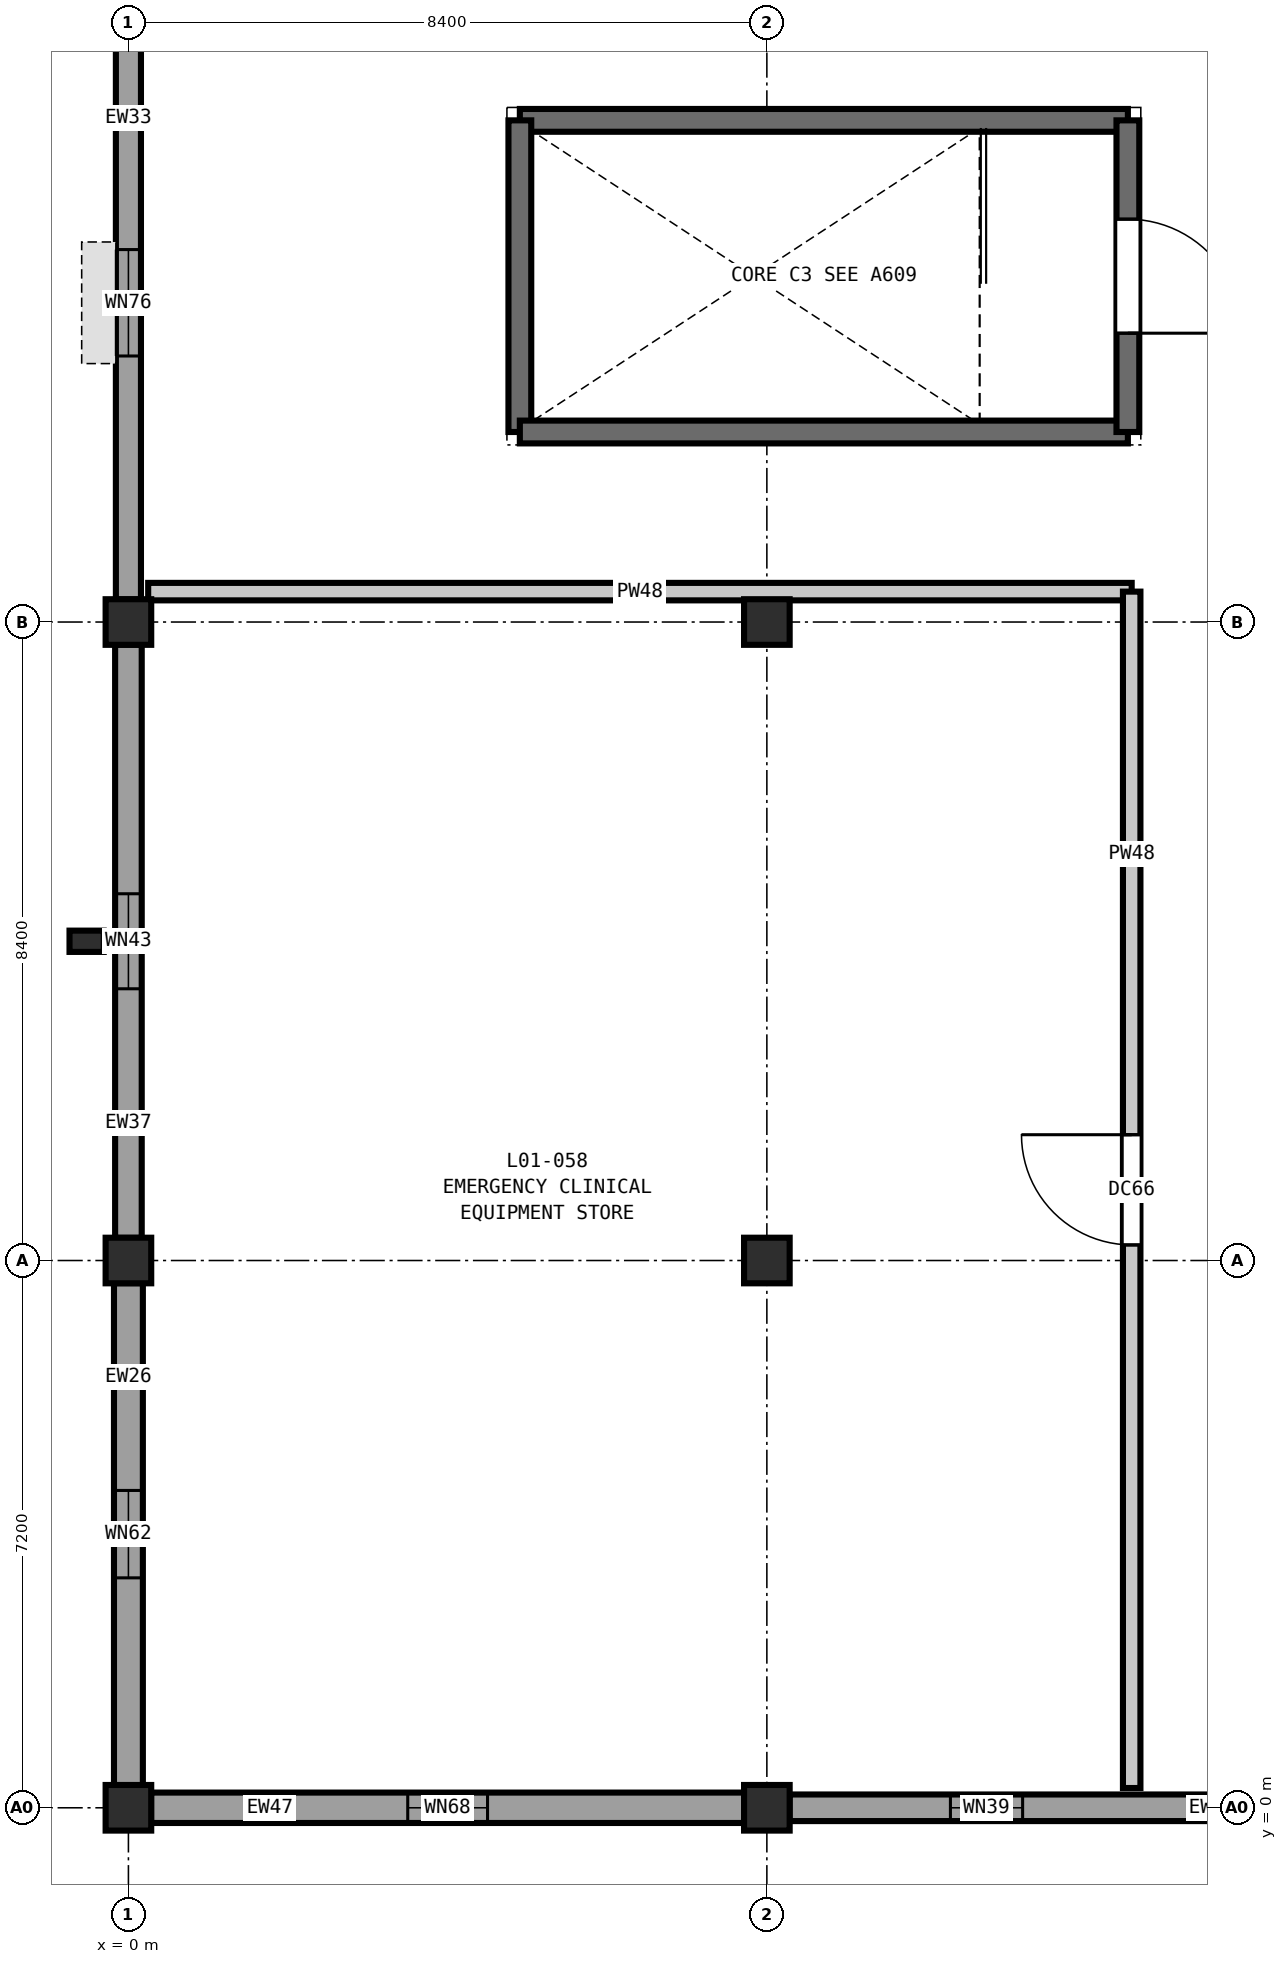
"""IFC4 building model, lengths in metres.
Left out: names, types, materials, properties, quantities, classifications, styles, units other than length and angle.
Written with IfcOpenShell. Run it as: python <this file> out.ifc"""

import sys

from ifc_helpers import new_model, si_unit, direction, frame, frame_2d, origin, origin_2d, place, context, subcontext, project, spatial, rectangle, extrude, element, fill, save


model = new_model("IFC4")
c1 = context("Model", 3, precision=1e-05, world=origin(), true_north=direction((0.0, 1.0)))
c2 = subcontext(c1, "Body", "Model", "MODEL_VIEW")
j1 = project(units=[si_unit("LENGTHUNIT", "METRE"), si_unit("PLANEANGLEUNIT", "RADIAN")], contexts=[c1])
p1 = place(None, origin())
s1 = spatial("IfcSite", under=j1, at=p1, CompositionType="ELEMENT")
p2 = place(p1, origin())
s2 = spatial("IfcBuilding", under=s1, at=p2, CompositionType="ELEMENT")
p3 = place(p2, frame((0.0, 0.0, 5.4)))
s3 = spatial("IfcBuildingStorey", under=s2, at=p3, CompositionType="ELEMENT", Elevation=5.4)
for number, where, z_axis, x_axis in (
    (1, (0.0, 0.0, 0.0), (0.0, 0.0, 1.0), (1.0, 0.0, 0.0)),
    (2, (0.0, 7.2, 0.0), (0.0, 0.0, 1.0), (1.0, 0.0, 0.0)),
    (3, (0.0, 15.6, 0.0), (0.0, 0.0, 1.0), (1.0, 0.0, 0.0)),
    (4, (8.4, 0.0, 0.0), (0.0, 0.0, 1.0), (1.0, 0.0, 0.0)),
    (5, (8.4, 7.2, 0.0), (0.0, 0.0, 1.0), (1.0, 0.0, 0.0)),
    (6, (8.4, 15.6, 0.0), (0.0, 0.0, 1.0), (1.0, 0.0, 0.0)),
):
    element("IfcColumn", number, at=place(p3, frame(where, z_axis=z_axis, x_axis=x_axis)), inside=s3, PredefinedType="COLUMN", context=c2, shape_type="SweptSolid", body=[
        extrude(rectangle(XDim=0.6, YDim=0.6, at=origin_2d()), origin(), (0.0, 0.0, 1.0), 5.4),
    ])
p4 = place(p3, frame((-0.55, 11.4, 0.0), z_axis=(0.0, 0.0, 1.0), x_axis=(1.0, 0.0, 0.0)))
e7 = element("IfcColumn", 7, at=p4, inside=s3, PredefinedType="PILASTER", context=c2, shape_type="SweptSolid", body=[
    extrude(rectangle(XDim=0.45, YDim=0.28, at=origin_2d()), origin(), (0.0, 0.0, 1.0), 5.4),
])
p5 = place(p3, frame((16.502, 0.0, 0.0), z_axis=(0.0, 0.0, 1.0), x_axis=(-1.0, 0.0, 0.0)))
e8 = element("IfcWall", 8, at=p5, inside=s3, PredefinedType="SOLIDWALL", context=c2, shape_type="SweptSolid", body=[
    extrude(rectangle(XDim=7.804, YDim=0.35, at=frame_2d((3.902, 0.0))), origin(), (0.0, 0.0, 1.0), 4.68),
])
p6 = place(p5, frame((4.737, 0.0, 0.9)))
e9 = element("IfcOpeningElement", 9, at=p6, cuts=e8, PredefinedType="OPENING", context=c2, shape_type="SweptSolid", body=[
    extrude(rectangle(XDim=0.95, YDim=1.4, at=frame_2d((0.475, 0.7))), frame((0.0, 0.185, 0.0), z_axis=(0.0, -1.0, 0.0), x_axis=(1.0, 0.0, 0.0)), (0.0, 0.0, 1.0), 0.37),
])
p7 = place(p3, frame((8.102, 0.0, 0.0), z_axis=(0.0, 0.0, 1.0), x_axis=(-1.0, 0.0, 0.0)))
e10 = element("IfcWall", 10, at=p7, inside=s3, PredefinedType="SOLIDWALL", context=c2, shape_type="SweptSolid", body=[
    extrude(rectangle(XDim=7.804, YDim=0.4, at=frame_2d((3.902, 0.0))), origin(), (0.0, 0.0, 1.0), 4.68),
])
p8 = place(p7, frame((3.377, 0.0, 0.9)))
e11 = element("IfcOpeningElement", 11, at=p8, cuts=e10, PredefinedType="OPENING", context=c2, shape_type="SweptSolid", body=[
    extrude(rectangle(XDim=1.05, YDim=1.4, at=frame_2d((0.525, 0.7))), frame((0.0, 0.21, 0.0), z_axis=(0.0, -1.0, 0.0), x_axis=(1.0, 0.0, 0.0)), (0.0, 0.0, 1.0), 0.42),
])
p9 = place(p3, frame((0.0, 0.298, 0.0), z_axis=(0.0, 0.0, 1.0), x_axis=(0.0, 1.0, 0.0)))
e12 = element("IfcWall", 12, at=p9, inside=s3, PredefinedType="SOLIDWALL", context=c2, shape_type="SweptSolid", body=[
    extrude(rectangle(XDim=6.604, YDim=0.38, at=frame_2d((3.302, 0.0))), origin(), (0.0, 0.0, 1.0), 4.68),
])
p10 = place(p9, frame((2.727, 0.0, 0.9)))
e13 = element("IfcOpeningElement", 13, at=p10, cuts=e12, PredefinedType="OPENING", context=c2, shape_type="SweptSolid", body=[
    extrude(rectangle(XDim=1.15, YDim=1.4, at=frame_2d((0.575, 0.7))), frame((0.0, 0.2, 0.0), z_axis=(0.0, -1.0, 0.0), x_axis=(1.0, 0.0, 0.0)), (0.0, 0.0, 1.0), 0.4),
])
p11 = place(p3, frame((0.0, 7.498, 0.0), z_axis=(0.0, 0.0, 1.0), x_axis=(0.0, 1.0, 0.0)))
e14 = element("IfcWall", 14, at=p11, inside=s3, PredefinedType="SOLIDWALL", context=c2, shape_type="SweptSolid", body=[
    extrude(rectangle(XDim=7.804, YDim=0.35, at=frame_2d((3.902, 0.0))), origin(), (0.0, 0.0, 1.0), 4.68),
])
p12 = place(p11, frame((3.277, 0.0, 0.9)))
e15 = element("IfcOpeningElement", 15, at=p12, cuts=e14, PredefinedType="OPENING", context=c2, shape_type="SweptSolid", body=[
    extrude(rectangle(XDim=1.25, YDim=1.4, at=frame_2d((0.625, 0.7))), frame((0.0, 0.185, 0.0), z_axis=(0.0, -1.0, 0.0), x_axis=(1.0, 0.0, 0.0)), (0.0, 0.0, 1.0), 0.37),
])
p13 = place(p3, frame((0.0, 15.898, 0.0), z_axis=(0.0, 0.0, 1.0), x_axis=(0.0, 1.0, 0.0)))
e16 = element("IfcWall", 16, at=p13, inside=s3, PredefinedType="SOLIDWALL", context=c2, shape_type="SweptSolid", body=[
    extrude(rectangle(XDim=7.804, YDim=0.33, at=frame_2d((3.902, 0.0))), origin(), (0.0, 0.0, 1.0), 4.68),
])
p14 = place(p13, frame((3.202, 0.0, 0.9)))
e17 = element("IfcOpeningElement", 17, at=p14, cuts=e16, PredefinedType="OPENING", context=c2, shape_type="SweptSolid", body=[
    extrude(rectangle(XDim=1.4, YDim=1.4, at=frame_2d((0.7, 0.7))), frame((0.0, 0.175, 0.0), z_axis=(0.0, -1.0, 0.0), x_axis=(1.0, 0.0, 0.0)), (0.0, 0.0, 1.0), 0.35),
])
p15 = place(p3, frame((13.15, 22.2, 0.0), z_axis=(0.0, 0.0, 1.0), x_axis=(-1.0, 0.0, 0.0)))
e18 = element("IfcWall", 18, at=p15, inside=s3, PredefinedType="SHEAR", context=c2, shape_type="SweptSolid", body=[
    extrude(rectangle(XDim=8.0, YDim=0.3, at=frame_2d((4.0, 0.0))), origin(), (0.0, 0.0, 1.0), 5.4),
])
p16 = place(p3, frame((5.15, 22.2, 0.0), z_axis=(0.0, 0.0, 1.0), x_axis=(0.0, -1.0, 0.0)))
e19 = element("IfcWall", 19, at=p16, inside=s3, PredefinedType="SHEAR", context=c2, shape_type="SweptSolid", body=[
    extrude(rectangle(XDim=4.1, YDim=0.3, at=frame_2d((2.05, 0.0))), origin(), (0.0, 0.0, 1.0), 5.4),
])
p17 = place(p3, frame((5.15, 18.1, 0.0), z_axis=(0.0, 0.0, 1.0), x_axis=(1.0, 0.0, 0.0)))
e20 = element("IfcWall", 20, at=p17, inside=s3, PredefinedType="SHEAR", context=c2, shape_type="SweptSolid", body=[
    extrude(rectangle(XDim=8.0, YDim=0.3, at=frame_2d((4.0, 0.0))), origin(), (0.0, 0.0, 1.0), 5.4),
])
p18 = place(p3, frame((13.15, 18.1, 0.0), z_axis=(0.0, 0.0, 1.0), x_axis=(0.0, 1.0, 0.0)))
e21 = element("IfcWall", 21, at=p18, inside=s3, PredefinedType="SHEAR", context=c2, shape_type="SweptSolid", body=[
    extrude(rectangle(XDim=4.1, YDim=0.3, at=frame_2d((2.05, 0.0))), origin(), (0.0, 0.0, 1.0), 5.4),
])
p19 = place(p18, frame((1.3, 0.0, 0.0)))
e22 = element("IfcOpeningElement", 22, at=p19, cuts=e21, PredefinedType="OPENING", context=c2, shape_type="SweptSolid", body=[
    extrude(rectangle(XDim=1.5, YDim=2.2, at=frame_2d((0.75, 1.1))), frame((0.0, 0.16, 0.0), z_axis=(0.0, -1.0, 0.0), x_axis=(1.0, 0.0, 0.0)), (0.0, 0.0, 1.0), 0.32),
])
p20 = place(p3, frame((0.26, 16.0, 0.0), z_axis=(0.0, 0.0, 1.0), x_axis=(1.0, 0.0, 0.0)))
e23 = element("IfcWall", 23, at=p20, inside=s3, PredefinedType="PARTITIONING", context=c2, shape_type="SweptSolid", body=[
    extrude(rectangle(XDim=12.94, YDim=0.23, at=frame_2d((6.47, 0.0))), origin(), (0.0, 0.0, 1.0), 5.05),
])
p21 = place(p3, frame((13.2, 0.26, 0.0), z_axis=(0.0, 0.0, 1.0), x_axis=(0.0, 1.0, 0.0)))
e24 = element("IfcWall", 24, at=p21, inside=s3, PredefinedType="PARTITIONING", context=c2, shape_type="SweptSolid", body=[
    extrude(rectangle(XDim=15.74, YDim=0.23, at=frame_2d((7.87, 0.0))), origin(), (0.0, 0.0, 1.0), 5.05),
])
p22 = place(p21, frame((7.145, 0.0, 0.0)))
e25 = element("IfcOpeningElement", 25, at=p22, cuts=e24, PredefinedType="OPENING", context=c2, shape_type="SweptSolid", body=[
    extrude(rectangle(XDim=1.45, YDim=2.25, at=frame_2d((0.725, 1.125))), frame((0.0, 0.125, 0.0), z_axis=(0.0, -1.0, 0.0), x_axis=(1.0, 0.0, 0.0)), (0.0, 0.0, 1.0), 0.25),
])
p23 = place(p6, origin())
e26 = element("IfcWindow", 26, at=p23, inside=s3, PartitioningType="SINGLE_PANEL", PredefinedType="WINDOW", context=c2, shape_type="SweptSolid", body=[
    extrude(rectangle(XDim=0.95, YDim=1.4, at=frame_2d((0.475, 0.7))), frame((0.0, 0.03, 0.0), z_axis=(0.0, -1.0, 0.0), x_axis=(1.0, 0.0, 0.0)), (0.0, 0.0, 1.0), 0.06),
])
fill(e9, e26)
p24 = place(p8, origin())
e27 = element("IfcWindow", 27, at=p24, inside=s3, PartitioningType="SINGLE_PANEL", PredefinedType="WINDOW", context=c2, shape_type="SweptSolid", body=[
    extrude(rectangle(XDim=1.05, YDim=1.4, at=frame_2d((0.525, 0.7))), frame((0.0, 0.03, 0.0), z_axis=(0.0, -1.0, 0.0), x_axis=(1.0, 0.0, 0.0)), (0.0, 0.0, 1.0), 0.06),
])
fill(e11, e27)
p25 = place(p10, origin())
e28 = element("IfcWindow", 28, at=p25, inside=s3, PartitioningType="SINGLE_PANEL", PredefinedType="WINDOW", context=c2, shape_type="SweptSolid", body=[
    extrude(rectangle(XDim=1.15, YDim=1.4, at=frame_2d((0.575, 0.7))), frame((0.0, 0.03, 0.0), z_axis=(0.0, -1.0, 0.0), x_axis=(1.0, 0.0, 0.0)), (0.0, 0.0, 1.0), 0.06),
])
fill(e13, e28)
p26 = place(p12, origin())
e29 = element("IfcWindow", 29, at=p26, inside=s3, PartitioningType="SINGLE_PANEL", PredefinedType="WINDOW", context=c2, shape_type="SweptSolid", body=[
    extrude(rectangle(XDim=1.25, YDim=1.4, at=frame_2d((0.625, 0.7))), frame((0.0, 0.03, 0.0), z_axis=(0.0, -1.0, 0.0), x_axis=(1.0, 0.0, 0.0)), (0.0, 0.0, 1.0), 0.06),
])
fill(e15, e29)
p27 = place(p14, origin())
e30 = element("IfcWindow", 30, at=p27, inside=s3, PartitioningType="SINGLE_PANEL", PredefinedType="WINDOW", context=c2, shape_type="SweptSolid", body=[
    extrude(rectangle(XDim=1.4, YDim=1.4, at=frame_2d((0.7, 0.7))), frame((0.0, 0.03, 0.0), z_axis=(0.0, -1.0, 0.0), x_axis=(1.0, 0.0, 0.0)), (0.0, 0.0, 1.0), 0.06),
])
fill(e17, e30)
p28 = place(p19, frame((1.5, 0.0, 0.0), z_axis=(0.0, 0.0, 1.0), x_axis=(-1.0, 0.0, 0.0)))
e31 = element("IfcDoor", 31, at=p28, inside=s3, OperationType="SINGLE_SWING_RIGHT", PredefinedType="DOOR", context=c2, shape_type="SweptSolid", body=[
    extrude(rectangle(XDim=1.5, YDim=2.2, at=frame_2d((0.75, 1.1))), frame((0.0, 0.025, 0.0), z_axis=(0.0, -1.0, 0.0), x_axis=(1.0, 0.0, 0.0)), (0.0, 0.0, 1.0), 0.05),
])
fill(e22, e31)
p29 = place(p22, origin())
e32 = element("IfcDoor", 32, at=p29, inside=s3, OperationType="SINGLE_SWING_RIGHT", PredefinedType="DOOR", context=c2, shape_type="SweptSolid", body=[
    extrude(rectangle(XDim=1.45, YDim=2.25, at=frame_2d((0.725, 1.125))), frame((0.0, 0.025, 0.0), z_axis=(0.0, -1.0, 0.0), x_axis=(1.0, 0.0, 0.0)), (0.0, 0.0, 1.0), 0.05),
])
fill(e25, e32)
save(model, sys.argv[1])
